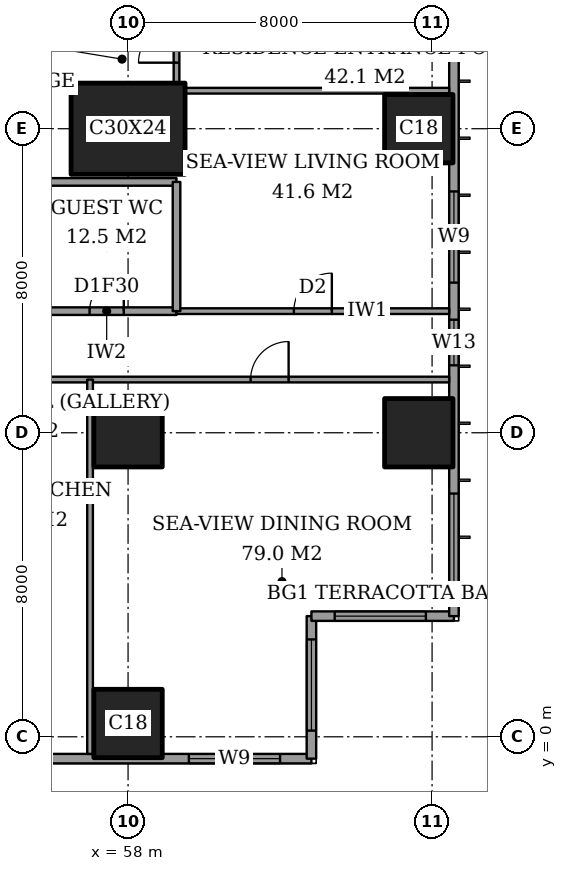
"""IFC4 building model, lengths in metres.
Left out: names, types, materials, properties, quantities, classifications, styles, units other than length and angle.
Written with IfcOpenShell. Run it as: python <this file> out.ifc"""

import sys

from ifc_helpers import new_model, si_unit, direction, frame, frame_2d, origin, origin_2d, place, context, subcontext, project, spatial, rectangle, extrude, element, fill, save


model = new_model("IFC4")
c1 = context("Model", 3, precision=1e-05, world=origin(), true_north=direction((0.0, 1.0)))
c2 = subcontext(c1, "Body", "Model", "MODEL_VIEW")
j1 = project(units=[si_unit("LENGTHUNIT", "METRE"), si_unit("PLANEANGLEUNIT", "RADIAN")], contexts=[c1])
p1 = place(None, origin())
s1 = spatial("IfcSite", under=j1, at=p1, CompositionType="ELEMENT")
p2 = place(p1, origin())
s2 = spatial("IfcBuilding", under=s1, at=p2, CompositionType="ELEMENT")
p3 = place(p2, frame((0.0, 0.0, 185.8)))
s3 = spatial("IfcBuildingStorey", under=s2, at=p3, CompositionType="ELEMENT", Elevation=185.8)
for number, where, z_axis, x_axis in (
    (1, (58.0, 0.35, 0.0), (0.0, 0.0, 1.0), (1.0, 0.0, 0.0)),
    (2, (58.0, 8.0, 0.0), (0.0, 0.0, 1.0), (1.0, 0.0, 0.0)),
):
    element("IfcColumn", number, at=place(p3, frame(where, z_axis=z_axis, x_axis=x_axis)), inside=s3, PredefinedType="COLUMN", context=c2, shape_type="SweptSolid", body=[
        extrude(rectangle(XDim=1.8, YDim=1.8, at=origin_2d()), origin(), (0.0, 0.0, 1.0), 3.6),
    ])
p4 = place(p3, frame((58.0, 16.0, 0.0), z_axis=(0.0, 0.0, 1.0), x_axis=(1.0, 0.0, 0.0)))
e3 = element("IfcColumn", 3, at=p4, inside=s3, PredefinedType="COLUMN", context=c2, shape_type="SweptSolid", body=[
    extrude(rectangle(XDim=3.0, YDim=2.4, at=origin_2d()), origin(), (0.0, 0.0, 1.0), 3.6),
])
for number, where, z_axis, x_axis in (
    (4, (65.65, 8.0, 0.0), (0.0, 0.0, 1.0), (1.0, 0.0, 0.0)),
    (5, (65.65, 16.0, 0.0), (0.0, 0.0, 1.0), (1.0, 0.0, 0.0)),
):
    element("IfcColumn", number, at=place(p3, frame(where, z_axis=z_axis, x_axis=x_axis)), inside=s3, PredefinedType="COLUMN", context=c2, shape_type="SweptSolid", body=[
        extrude(rectangle(XDim=1.8, YDim=1.8, at=origin_2d()), origin(), (0.0, 0.0, 1.0), 3.6),
    ])
p5 = place(p3, frame((41.425, -0.575, 0.0), z_axis=(0.0, 0.0, 1.0), x_axis=(1.0, 0.0, 0.0)))
e6 = element("IfcWall", 6, at=p5, inside=s3, PredefinedType="SOLIDWALL", context=c2, shape_type="SweptSolid", body=[
    extrude(rectangle(XDim=21.4, YDim=0.25, at=frame_2d((10.7, 0.0))), origin(), (0.0, 0.0, 1.0), 3.6),
])
p6 = place(p5, frame((3.6, 0.0, 0.2)))
e7 = element("IfcOpeningElement", 7, at=p6, cuts=e6, PredefinedType="OPENING", context=c2, shape_type="SweptSolid", body=[
    extrude(rectangle(XDim=2.4, YDim=2.4, at=frame_2d((1.2, 1.2))), frame((0.0, 0.135, 0.0), z_axis=(0.0, -1.0, 0.0), x_axis=(1.0, 0.0, 0.0)), (0.0, 0.0, 1.0), 0.27),
])
p7 = place(p5, frame((10.9, 0.0, 0.2)))
e8 = element("IfcOpeningElement", 8, at=p7, cuts=e6, PredefinedType="OPENING", context=c2, shape_type="SweptSolid", body=[
    extrude(rectangle(XDim=1.2, YDim=2.4, at=frame_2d((0.6, 1.2))), frame((0.0, 0.135, 0.0), z_axis=(0.0, -1.0, 0.0), x_axis=(1.0, 0.0, 0.0)), (0.0, 0.0, 1.0), 0.27),
])
p8 = place(p5, frame((13.325, 0.0, 0.2)))
e9 = element("IfcOpeningElement", 9, at=p8, cuts=e6, PredefinedType="OPENING", context=c2, shape_type="SweptSolid", body=[
    extrude(rectangle(XDim=1.2, YDim=2.4, at=frame_2d((0.6, 1.2))), frame((0.0, 0.135, 0.0), z_axis=(0.0, -1.0, 0.0), x_axis=(1.0, 0.0, 0.0)), (0.0, 0.0, 1.0), 0.27),
])
p9 = place(p5, frame((18.175, 0.0, 0.2)))
e10 = element("IfcOpeningElement", 10, at=p9, cuts=e6, PredefinedType="OPENING", context=c2, shape_type="SweptSolid", body=[
    extrude(rectangle(XDim=2.4, YDim=2.4, at=frame_2d((1.2, 1.2))), frame((0.0, 0.135, 0.0), z_axis=(0.0, -1.0, 0.0), x_axis=(1.0, 0.0, 0.0)), (0.0, 0.0, 1.0), 0.27),
])
p10 = place(p3, frame((62.825, -0.575, 0.0), z_axis=(0.0, 0.0, 1.0), x_axis=(0.0, 1.0, 0.0)))
e11 = element("IfcWall", 11, at=p10, inside=s3, PredefinedType="SOLIDWALL", context=c2, shape_type="SweptSolid", body=[
    extrude(rectangle(XDim=3.75, YDim=0.25, at=frame_2d((1.875, 0.0))), origin(), (0.0, 0.0, 1.0), 3.6),
])
p11 = place(p10, frame((0.738, 0.0, 0.2)))
e12 = element("IfcOpeningElement", 12, at=p11, cuts=e11, PredefinedType="OPENING", context=c2, shape_type="SweptSolid", body=[
    extrude(rectangle(XDim=2.4, YDim=2.4, at=frame_2d((1.2, 1.2))), frame((0.0, 0.135, 0.0), z_axis=(0.0, -1.0, 0.0), x_axis=(1.0, 0.0, 0.0)), (0.0, 0.0, 1.0), 0.27),
])
p12 = place(p3, frame((62.825, 3.175, 0.0), z_axis=(0.0, 0.0, 1.0), x_axis=(1.0, 0.0, 0.0)))
e13 = element("IfcWall", 13, at=p12, inside=s3, PredefinedType="SOLIDWALL", context=c2, shape_type="SweptSolid", body=[
    extrude(rectangle(XDim=3.75, YDim=0.25, at=frame_2d((1.875, 0.0))), origin(), (0.0, 0.0, 1.0), 3.6),
])
p13 = place(p12, frame((0.613, 0.0, 0.2)))
e14 = element("IfcOpeningElement", 14, at=p13, cuts=e13, PredefinedType="OPENING", context=c2, shape_type="SweptSolid", body=[
    extrude(rectangle(XDim=2.4, YDim=2.4, at=frame_2d((1.2, 1.2))), frame((0.0, 0.135, 0.0), z_axis=(0.0, -1.0, 0.0), x_axis=(1.0, 0.0, 0.0)), (0.0, 0.0, 1.0), 0.27),
])
p14 = place(p3, frame((66.575, 3.175, 0.0), z_axis=(0.0, 0.0, 1.0), x_axis=(0.0, 1.0, 0.0)))
e15 = element("IfcWall", 15, at=p14, inside=s3, PredefinedType="SOLIDWALL", context=c2, shape_type="SweptSolid", body=[
    extrude(rectangle(XDim=41.65, YDim=0.25, at=frame_2d((20.825, 0.0))), origin(), (0.0, 0.0, 1.0), 3.6),
])
p15 = place(p14, frame((0.825, 0.0, 0.2)))
e16 = element("IfcOpeningElement", 16, at=p15, cuts=e15, PredefinedType="OPENING", context=c2, shape_type="SweptSolid", body=[
    extrude(rectangle(XDim=2.4, YDim=2.4, at=frame_2d((1.2, 1.2))), frame((0.0, 0.135, 0.0), z_axis=(0.0, -1.0, 0.0), x_axis=(1.0, 0.0, 0.0)), (0.0, 0.0, 1.0), 0.27),
])
p16 = place(p14, frame((6.6, 0.0, 0.2)))
e17 = element("IfcOpeningElement", 17, at=p16, cuts=e15, PredefinedType="OPENING", context=c2, shape_type="SweptSolid", body=[
    extrude(rectangle(XDim=1.2, YDim=2.4, at=frame_2d((0.6, 1.2))), frame((0.0, 0.135, 0.0), z_axis=(0.0, -1.0, 0.0), x_axis=(1.0, 0.0, 0.0)), (0.0, 0.0, 1.0), 0.27),
])
p17 = place(p14, frame((8.775, 0.0, 0.2)))
e18 = element("IfcOpeningElement", 18, at=p17, cuts=e15, PredefinedType="OPENING", context=c2, shape_type="SweptSolid", body=[
    extrude(rectangle(XDim=2.4, YDim=2.4, at=frame_2d((1.2, 1.2))), frame((0.0, 0.135, 0.0), z_axis=(0.0, -1.0, 0.0), x_axis=(1.0, 0.0, 0.0)), (0.0, 0.0, 1.0), 0.27),
])
p18 = place(p14, frame((15.675, 0.0, 0.2)))
e19 = element("IfcOpeningElement", 19, at=p18, cuts=e15, PredefinedType="OPENING", context=c2, shape_type="SweptSolid", body=[
    extrude(rectangle(XDim=2.4, YDim=2.4, at=frame_2d((1.2, 1.2))), frame((0.0, 0.135, 0.0), z_axis=(0.0, -1.0, 0.0), x_axis=(1.0, 0.0, 0.0)), (0.0, 0.0, 1.0), 0.27),
])
p19 = place(p14, frame((23.575, 0.0, 0.2)))
e20 = element("IfcOpeningElement", 20, at=p19, cuts=e15, PredefinedType="OPENING", context=c2, shape_type="SweptSolid", body=[
    extrude(rectangle(XDim=2.4, YDim=2.4, at=frame_2d((1.2, 1.2))), frame((0.0, 0.135, 0.0), z_axis=(0.0, -1.0, 0.0), x_axis=(1.0, 0.0, 0.0)), (0.0, 0.0, 1.0), 0.27),
])
p20 = place(p14, frame((30.775, 0.0, 0.2)))
e21 = element("IfcOpeningElement", 21, at=p20, cuts=e15, PredefinedType="OPENING", context=c2, shape_type="SweptSolid", body=[
    extrude(rectangle(XDim=2.4, YDim=2.4, at=frame_2d((1.2, 1.2))), frame((0.0, 0.135, 0.0), z_axis=(0.0, -1.0, 0.0), x_axis=(1.0, 0.0, 0.0)), (0.0, 0.0, 1.0), 0.27),
])
p21 = place(p14, frame((34.55, 0.0, 0.2)))
e22 = element("IfcOpeningElement", 22, at=p21, cuts=e15, PredefinedType="OPENING", context=c2, shape_type="SweptSolid", body=[
    extrude(rectangle(XDim=1.2, YDim=2.4, at=frame_2d((0.6, 1.2))), frame((0.0, 0.135, 0.0), z_axis=(0.0, -1.0, 0.0), x_axis=(1.0, 0.0, 0.0)), (0.0, 0.0, 1.0), 0.27),
])
p22 = place(p14, frame((38.425, 0.0, 0.2)))
e23 = element("IfcOpeningElement", 23, at=p22, cuts=e15, PredefinedType="OPENING", context=c2, shape_type="SweptSolid", body=[
    extrude(rectangle(XDim=2.4, YDim=2.4, at=frame_2d((1.2, 1.2))), frame((0.0, 0.135, 0.0), z_axis=(0.0, -1.0, 0.0), x_axis=(1.0, 0.0, 0.0)), (0.0, 0.0, 1.0), 0.27),
])
p23 = place(p3, frame((41.439, 9.4, 0.0), z_axis=(0.0, 0.0, 1.0), x_axis=(1.0, 0.0, 0.0)))
e24 = element("IfcWall", 24, at=p23, inside=s3, PredefinedType="PARTITIONING", context=c2, shape_type="SweptSolid", body=[
    extrude(rectangle(XDim=25.011, YDim=0.15, at=frame_2d((12.505, 0.0))), origin(), (0.0, 0.0, 1.0), 3.35),
])
p24 = place(p23, frame((19.786, 0.0, 0.0)))
e25 = element("IfcOpeningElement", 25, at=p24, cuts=e24, PredefinedType="OPENING", context=c2, shape_type="SweptSolid", body=[
    extrude(rectangle(XDim=1.0, YDim=2.1, at=frame_2d((0.5, 1.05))), frame((0.0, 0.085, 0.0), z_axis=(0.0, -1.0, 0.0), x_axis=(1.0, 0.0, 0.0)), (0.0, 0.0, 1.0), 0.17),
])
p25 = place(p23, frame((13.411, 0.0, 0.0)))
e26 = element("IfcOpeningElement", 26, at=p25, cuts=e24, PredefinedType="OPENING", context=c2, shape_type="SweptSolid", body=[
    extrude(rectangle(XDim=1.0, YDim=2.1, at=frame_2d((0.5, 1.05))), frame((0.0, 0.085, 0.0), z_axis=(0.0, -1.0, 0.0), x_axis=(1.0, 0.0, 0.0)), (0.0, 0.0, 1.0), 0.17),
])
p26 = place(p23, frame((5.661, 0.0, 0.0)))
e27 = element("IfcOpeningElement", 27, at=p26, cuts=e24, PredefinedType="OPENING", context=c2, shape_type="SweptSolid", body=[
    extrude(rectangle(XDim=1.0, YDim=2.1, at=frame_2d((0.5, 1.05))), frame((0.0, 0.085, 0.0), z_axis=(0.0, -1.0, 0.0), x_axis=(1.0, 0.0, 0.0)), (0.0, 0.0, 1.0), 0.17),
])
p27 = place(p3, frame((55.6, 11.2, 0.0), z_axis=(0.0, 0.0, 1.0), x_axis=(1.0, 0.0, 0.0)))
e28 = element("IfcWall", 28, at=p27, inside=s3, PredefinedType="PARTITIONING", context=c2, shape_type="SweptSolid", body=[
    extrude(rectangle(XDim=3.675, YDim=0.2, at=frame_2d((1.837, 0.0))), origin(), (0.0, 0.0, 1.0), 3.35),
])
p28 = place(p27, frame((1.387, 0.0, 0.0)))
e29 = element("IfcOpeningElement", 29, at=p28, cuts=e28, PredefinedType="OPENING", context=c2, shape_type="SweptSolid", body=[
    extrude(rectangle(XDim=0.9, YDim=2.1, at=frame_2d((0.45, 1.05))), frame((0.0, 0.11, 0.0), z_axis=(0.0, -1.0, 0.0), x_axis=(1.0, 0.0, 0.0)), (0.0, 0.0, 1.0), 0.22),
])
p29 = place(p3, frame((59.275, 11.2, 0.0), z_axis=(0.0, 0.0, 1.0), x_axis=(1.0, 0.0, 0.0)))
e30 = element("IfcWall", 30, at=p29, inside=s3, PredefinedType="PARTITIONING", context=c2, shape_type="SweptSolid", body=[
    extrude(rectangle(XDim=7.175, YDim=0.15, at=frame_2d((3.587, 0.0))), origin(), (0.0, 0.0, 1.0), 3.35),
])
p30 = place(p29, frame((3.087, 0.0, 0.0)))
e31 = element("IfcOpeningElement", 31, at=p30, cuts=e30, PredefinedType="OPENING", context=c2, shape_type="SweptSolid", body=[
    extrude(rectangle(XDim=1.0, YDim=2.1, at=frame_2d((0.5, 1.05))), frame((0.0, 0.085, 0.0), z_axis=(0.0, -1.0, 0.0), x_axis=(1.0, 0.0, 0.0)), (0.0, 0.0, 1.0), 0.17),
])
p31 = place(p3, frame((55.6, 14.6, 0.0), z_axis=(0.0, 0.0, 1.0), x_axis=(1.0, 0.0, 0.0)))
e32 = element("IfcWall", 32, at=p31, inside=s3, PredefinedType="PARTITIONING", context=c2, shape_type="SweptSolid", body=[
    extrude(rectangle(XDim=3.675, YDim=0.2, at=frame_2d((1.837, 0.0))), origin(), (0.0, 0.0, 1.0), 3.35),
])
p32 = place(p3, frame((59.5, 17.0, 0.0), z_axis=(0.0, 0.0, 1.0), x_axis=(1.0, 0.0, 0.0)))
e33 = element("IfcWall", 33, at=p32, inside=s3, PredefinedType="PARTITIONING", context=c2, shape_type="SweptSolid", body=[
    extrude(rectangle(XDim=6.95, YDim=0.15, at=frame_2d((3.475, 0.0))), origin(), (0.0, 0.0, 1.0), 3.35),
])
p33 = place(p3, frame((57.0, -0.45, 0.0), z_axis=(0.0, 0.0, 1.0), x_axis=(0.0, 1.0, 0.0)))
e34 = element("IfcWall", 34, at=p33, inside=s3, PredefinedType="PARTITIONING", context=c2, shape_type="SweptSolid", body=[
    extrude(rectangle(XDim=9.85, YDim=0.15, at=frame_2d((4.925, 0.0))), origin(), (0.0, 0.0, 1.0), 3.35),
])
p34 = place(p3, frame((59.275, 11.2, 0.0), z_axis=(0.0, 0.0, 1.0), x_axis=(0.0, 1.0, 0.0)))
e35 = element("IfcWall", 35, at=p34, inside=s3, PredefinedType="PARTITIONING", context=c2, shape_type="SweptSolid", body=[
    extrude(rectangle(XDim=3.4, YDim=0.2, at=frame_2d((1.7, 0.0))), origin(), (0.0, 0.0, 1.0), 3.35),
])
p35 = place(p3, frame((59.275, 17.2, 0.0), z_axis=(0.0, 0.0, 1.0), x_axis=(0.0, 1.0, 0.0)))
e36 = element("IfcWall", 36, at=p35, inside=s3, PredefinedType="PARTITIONING", context=c2, shape_type="SweptSolid", body=[
    extrude(rectangle(XDim=2.45, YDim=0.15, at=frame_2d((1.225, 0.0))), origin(), (0.0, 0.0, 1.0), 3.35),
])
p36 = place(p35, frame((0.538, 0.0, 0.0)))
e37 = element("IfcOpeningElement", 37, at=p36, cuts=e36, PredefinedType="OPENING", context=c2, shape_type="SweptSolid", body=[
    extrude(rectangle(XDim=1.0, YDim=2.1, at=frame_2d((0.5, 1.05))), frame((0.0, 0.085, 0.0), z_axis=(0.0, -1.0, 0.0), x_axis=(1.0, 0.0, 0.0)), (0.0, 0.0, 1.0), 0.17),
])
p37 = place(p9, origin())
e38 = element("IfcWindow", 38, at=p37, inside=s3, PartitioningType="SINGLE_PANEL", PredefinedType="WINDOW", context=c2, shape_type="SweptSolid", body=[
    extrude(rectangle(XDim=2.4, YDim=2.4, at=frame_2d((1.2, 1.2))), frame((0.0, 0.03, 0.0), z_axis=(0.0, -1.0, 0.0), x_axis=(1.0, 0.0, 0.0)), (0.0, 0.0, 1.0), 0.06),
])
fill(e10, e38)
p38 = place(p11, origin())
e39 = element("IfcWindow", 39, at=p38, inside=s3, PartitioningType="SINGLE_PANEL", PredefinedType="WINDOW", context=c2, shape_type="SweptSolid", body=[
    extrude(rectangle(XDim=2.4, YDim=2.4, at=frame_2d((1.2, 1.2))), frame((0.0, 0.03, 0.0), z_axis=(0.0, -1.0, 0.0), x_axis=(1.0, 0.0, 0.0)), (0.0, 0.0, 1.0), 0.06),
])
fill(e12, e39)
p39 = place(p13, origin())
e40 = element("IfcWindow", 40, at=p39, inside=s3, PartitioningType="SINGLE_PANEL", PredefinedType="WINDOW", context=c2, shape_type="SweptSolid", body=[
    extrude(rectangle(XDim=2.4, YDim=2.4, at=frame_2d((1.2, 1.2))), frame((0.0, 0.03, 0.0), z_axis=(0.0, -1.0, 0.0), x_axis=(1.0, 0.0, 0.0)), (0.0, 0.0, 1.0), 0.06),
])
fill(e14, e40)
p40 = place(p15, origin())
e41 = element("IfcWindow", 41, at=p40, inside=s3, PartitioningType="SINGLE_PANEL", PredefinedType="WINDOW", context=c2, shape_type="SweptSolid", body=[
    extrude(rectangle(XDim=2.4, YDim=2.4, at=frame_2d((1.2, 1.2))), frame((0.0, 0.03, 0.0), z_axis=(0.0, -1.0, 0.0), x_axis=(1.0, 0.0, 0.0)), (0.0, 0.0, 1.0), 0.06),
])
fill(e16, e41)
p41 = place(p16, origin())
e42 = element("IfcWindow", 42, at=p41, inside=s3, PartitioningType="SINGLE_PANEL", PredefinedType="WINDOW", context=c2, shape_type="SweptSolid", body=[
    extrude(rectangle(XDim=1.2, YDim=2.4, at=frame_2d((0.6, 1.2))), frame((0.0, 0.03, 0.0), z_axis=(0.0, -1.0, 0.0), x_axis=(1.0, 0.0, 0.0)), (0.0, 0.0, 1.0), 0.06),
])
fill(e17, e42)
p42 = place(p17, origin())
e43 = element("IfcWindow", 43, at=p42, inside=s3, PartitioningType="SINGLE_PANEL", PredefinedType="WINDOW", context=c2, shape_type="SweptSolid", body=[
    extrude(rectangle(XDim=2.4, YDim=2.4, at=frame_2d((1.2, 1.2))), frame((0.0, 0.03, 0.0), z_axis=(0.0, -1.0, 0.0), x_axis=(1.0, 0.0, 0.0)), (0.0, 0.0, 1.0), 0.06),
])
fill(e18, e43)
p43 = place(p24, origin())
e44 = element("IfcDoor", 44, at=p43, inside=s3, OperationType="SINGLE_SWING_LEFT", PredefinedType="DOOR", context=c2, shape_type="SweptSolid", body=[
    extrude(rectangle(XDim=1.0, YDim=2.1, at=frame_2d((0.5, 1.05))), frame((0.0, 0.025, 0.0), z_axis=(0.0, -1.0, 0.0), x_axis=(1.0, 0.0, 0.0)), (0.0, 0.0, 1.0), 0.05),
])
fill(e25, e44)
p44 = place(p30, origin())
e45 = element("IfcDoor", 45, at=p44, inside=s3, OperationType="SINGLE_SWING_LEFT", PredefinedType="DOOR", context=c2, shape_type="SweptSolid", body=[
    extrude(rectangle(XDim=1.0, YDim=2.1, at=frame_2d((0.5, 1.05))), frame((0.0, 0.025, 0.0), z_axis=(0.0, -1.0, 0.0), x_axis=(1.0, 0.0, 0.0)), (0.0, 0.0, 1.0), 0.05),
])
fill(e31, e45)
p45 = place(p36, origin())
e46 = element("IfcDoor", 46, at=p45, inside=s3, OperationType="SINGLE_SWING_RIGHT", PredefinedType="DOOR", context=c2, shape_type="SweptSolid", body=[
    extrude(rectangle(XDim=1.0, YDim=2.1, at=frame_2d((0.5, 1.05))), frame((0.0, 0.025, 0.0), z_axis=(0.0, -1.0, 0.0), x_axis=(1.0, 0.0, 0.0)), (0.0, 0.0, 1.0), 0.05),
])
fill(e37, e46)
p46 = place(p28, origin())
e47 = element("IfcDoor", 47, at=p46, inside=s3, OperationType="SINGLE_SWING_LEFT", PredefinedType="DOOR", context=c2, shape_type="SweptSolid", body=[
    extrude(rectangle(XDim=0.9, YDim=2.1, at=frame_2d((0.45, 1.05))), frame((0.0, 0.025, 0.0), z_axis=(0.0, -1.0, 0.0), x_axis=(1.0, 0.0, 0.0)), (0.0, 0.0, 1.0), 0.05),
])
fill(e29, e47)
save(model, sys.argv[1])
